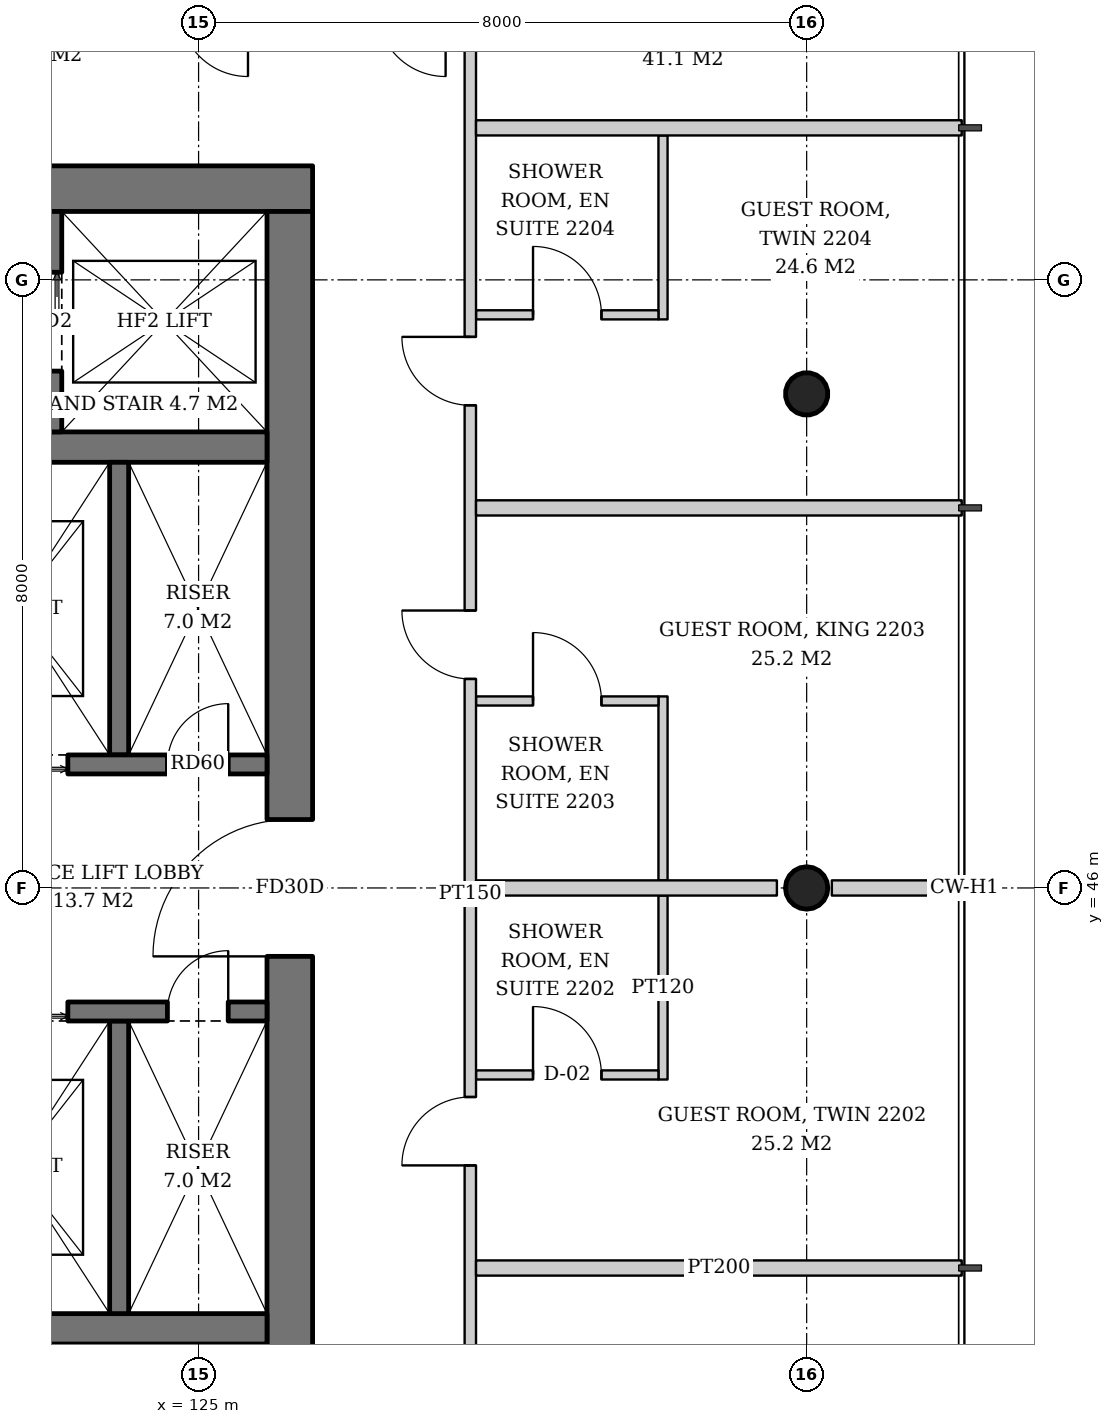
"""IFC4 building model, lengths in metres.
Left out: names, types, materials, properties, quantities, classifications, styles, units other than length and angle.
Written with IfcOpenShell. Run it as: python <this file> out.ifc"""

import sys

from ifc_helpers import new_model, si_unit, direction, frame, frame_2d, origin, origin_2d, place, context, subcontext, project, spatial, rectangle, hollow_circle, extrude, element, fill, save


model = new_model("IFC4")
c1 = context("Model", 3, precision=1e-05, world=origin(), true_north=direction((0.0, 1.0)))
c2 = subcontext(c1, "Body", "Model", "MODEL_VIEW")
j1 = project(units=[si_unit("LENGTHUNIT", "METRE"), si_unit("PLANEANGLEUNIT", "RADIAN")], contexts=[c1])
p1 = place(None, origin())
s1 = spatial("IfcSite", under=j1, at=p1, CompositionType="ELEMENT")
p2 = place(p1, origin())
s2 = spatial("IfcBuilding", under=s1, at=p2, CompositionType="ELEMENT")
p3 = place(p2, frame((0.0, 0.0, 89.4)))
s3 = spatial("IfcBuildingStorey", under=s2, at=p3, CompositionType="ELEMENT", Elevation=89.4)
p4 = place(p3, frame((133.052, 46.0, 0.0), z_axis=(-0.043069538298, 0.0, 0.999072076915), x_axis=(0.0, -1.0, 0.0)))
e1 = element("IfcColumn", 1, at=p4, inside=s3, PredefinedType="COLUMN", context=c2, shape_type="SweptSolid", body=[
    extrude(hollow_circle(Radius=0.28, WallThickness=0.02, at=origin_2d()), origin(), (0.0, 0.0, 1.0), 3.803),
])
p5 = place(p3, frame((133.052, 52.526, 0.0), z_axis=(-0.043059525333, -0.021561848751, 0.998839808957), x_axis=(0.44774654769, -0.894160516368, 0.0)))
e2 = element("IfcColumn", 2, at=p5, inside=s3, PredefinedType="COLUMN", context=c2, shape_type="SweptSolid", body=[
    extrude(hollow_circle(Radius=0.28, WallThickness=0.02, at=origin_2d()), origin(), (0.0, 0.0, 1.0), 3.804),
])
p6 = place(p3, frame((107.5, 55.2, 0.0), z_axis=(0.0, 0.0, 1.0), x_axis=(1.0, 0.0, 0.0)))
e3 = element("IfcWall", 3, at=p6, inside=s3, PredefinedType="SHEAR", context=c2, shape_type="SweptSolid", body=[
    extrude(rectangle(XDim=19.0, YDim=0.6, at=frame_2d((9.5, 0.0))), origin(), (0.0, 0.0, 1.0), 3.8),
])
p7 = place(p6, frame((14.14, 0.0, 0.0)))
e4 = element("IfcOpeningElement", 4, at=p7, cuts=e3, PredefinedType="OPENING", context=c2, shape_type="SweptSolid", body=[
    extrude(rectangle(XDim=1.0, YDim=2.1, at=frame_2d((0.5, 1.05))), frame((0.0, 0.31, 0.0), z_axis=(0.0, -1.0, 0.0), x_axis=(1.0, 0.0, 0.0)), (0.0, 0.0, 1.0), 0.62),
])
p8 = place(p6, frame((2.425, 0.0, 0.0)))
e5 = element("IfcOpeningElement", 5, at=p8, cuts=e3, PredefinedType="OPENING", context=c2, shape_type="SweptSolid", body=[
    extrude(rectangle(XDim=1.0, YDim=2.1, at=frame_2d((0.5, 1.05))), frame((0.0, 0.31, 0.0), z_axis=(0.0, -1.0, 0.0), x_axis=(1.0, 0.0, 0.0)), (0.0, 0.0, 1.0), 0.62),
])
p9 = place(p3, frame((126.2, 37.1, 0.0), z_axis=(0.0, 0.0, 1.0), x_axis=(0.0, 1.0, 0.0)))
e6 = element("IfcWall", 6, at=p9, inside=s3, PredefinedType="SHEAR", context=c2, shape_type="SweptSolid", body=[
    extrude(rectangle(XDim=17.8, YDim=0.6, at=frame_2d((8.9, 0.0))), origin(), (0.0, 0.0, 1.0), 3.8),
])
p10 = place(p9, frame((8.0, 0.0, 0.0)))
e7 = element("IfcOpeningElement", 7, at=p10, cuts=e6, PredefinedType="OPENING", context=c2, shape_type="SweptSolid", body=[
    extrude(rectangle(XDim=1.8, YDim=2.4, at=frame_2d((0.9, 1.2))), frame((0.0, 0.31, 0.0), z_axis=(0.0, -1.0, 0.0), x_axis=(1.0, 0.0, 0.0)), (0.0, 0.0, 1.0), 0.62),
])
for number, where, z_axis, x_axis in (
    (8, (108.1, 40.2, 0.0), (0.0, 0.0, 1.0), (1.0, 0.0, 0.0)),
    (9, (108.1, 51.8, 0.0), (0.0, 0.0, 1.0), (1.0, 0.0, 0.0)),
):
    element("IfcWall", number, at=place(p3, frame(where, z_axis=z_axis, x_axis=x_axis)), inside=s3, PredefinedType="SHEAR", context=c2, shape_type="SweptSolid", body=[
        extrude(rectangle(XDim=17.8, YDim=0.4, at=frame_2d((8.9, 0.0))), origin(), (0.0, 0.0, 1.0), 3.8),
    ])
p11 = place(p3, frame((123.075, 52.0, 0.0), z_axis=(0.0, 0.0, 1.0), x_axis=(0.0, 1.0, 0.0)))
e10 = element("IfcWall", 10, at=p11, inside=s3, PredefinedType="SHEAR", context=c2, shape_type="SweptSolid", body=[
    extrude(rectangle(XDim=2.9, YDim=0.25, at=frame_2d((1.45, 0.0))), origin(), (0.0, 0.0, 1.0), 3.8),
])
p12 = place(p11, frame((0.8, 0.0, 0.0)))
e11 = element("IfcOpeningElement", 11, at=p12, cuts=e10, PredefinedType="OPENING", context=c2, shape_type="SweptSolid", body=[
    extrude(rectangle(XDim=1.3, YDim=2.2, at=frame_2d((0.65, 1.1))), frame((0.0, 0.135, 0.0), z_axis=(0.0, -1.0, 0.0), x_axis=(1.0, 0.0, 0.0)), (0.0, 0.0, 1.0), 0.27),
])
p13 = place(p3, frame((123.955, 47.75, 0.0), z_axis=(0.0, 0.0, 1.0), x_axis=(0.0, 1.0, 0.0)))
e12 = element("IfcWall", 12, at=p13, inside=s3, PredefinedType="SHEAR", context=c2, shape_type="SweptSolid", body=[
    extrude(rectangle(XDim=3.85, YDim=0.25, at=frame_2d((1.925, 0.0))), origin(), (0.0, 0.0, 1.0), 3.8),
])
p14 = place(p3, frame((121.33, 47.625, 0.0), z_axis=(0.0, 0.0, 1.0), x_axis=(1.0, 0.0, 0.0)))
e13 = element("IfcWall", 13, at=p14, inside=s3, PredefinedType="SHEAR", context=c2, shape_type="SweptSolid", body=[
    extrude(rectangle(XDim=4.57, YDim=0.25, at=frame_2d((2.285, 0.0))), origin(), (0.0, 0.0, 1.0), 3.8),
])
p15 = place(p14, frame((0.55, 0.0, 0.0)))
e14 = element("IfcOpeningElement", 14, at=p15, cuts=e13, PredefinedType="OPENING", context=c2, shape_type="SweptSolid", body=[
    extrude(rectangle(XDim=1.4, YDim=2.4, at=frame_2d((0.7, 1.2))), frame((0.0, 0.135, 0.0), z_axis=(0.0, -1.0, 0.0), x_axis=(1.0, 0.0, 0.0)), (0.0, 0.0, 1.0), 0.27),
])
p16 = place(p14, frame((3.26, 0.0, 0.0)))
e15 = element("IfcOpeningElement", 15, at=p16, cuts=e13, PredefinedType="OPENING", context=c2, shape_type="SweptSolid", body=[
    extrude(rectangle(XDim=0.8, YDim=2.0, at=frame_2d((0.4, 1.0))), frame((0.0, 0.135, 0.0), z_axis=(0.0, -1.0, 0.0), x_axis=(1.0, 0.0, 0.0)), (0.0, 0.0, 1.0), 0.27),
])
p17 = place(p3, frame((123.955, 44.25, 0.0), z_axis=(0.0, 0.0, 1.0), x_axis=(0.0, -1.0, 0.0)))
e16 = element("IfcWall", 16, at=p17, inside=s3, PredefinedType="SHEAR", context=c2, shape_type="SweptSolid", body=[
    extrude(rectangle(XDim=3.85, YDim=0.25, at=frame_2d((1.925, 0.0))), origin(), (0.0, 0.0, 1.0), 3.8),
])
p18 = place(p3, frame((121.33, 44.375, 0.0), z_axis=(0.0, 0.0, 1.0), x_axis=(1.0, 0.0, 0.0)))
e17 = element("IfcWall", 17, at=p18, inside=s3, PredefinedType="SHEAR", context=c2, shape_type="SweptSolid", body=[
    extrude(rectangle(XDim=4.57, YDim=0.25, at=frame_2d((2.285, 0.0))), origin(), (0.0, 0.0, 1.0), 3.8),
])
p19 = place(p18, frame((0.55, 0.0, 0.0)))
e18 = element("IfcOpeningElement", 18, at=p19, cuts=e17, PredefinedType="OPENING", context=c2, shape_type="SweptSolid", body=[
    extrude(rectangle(XDim=1.4, YDim=2.4, at=frame_2d((0.7, 1.2))), frame((0.0, 0.135, 0.0), z_axis=(0.0, -1.0, 0.0), x_axis=(1.0, 0.0, 0.0)), (0.0, 0.0, 1.0), 0.27),
])
p20 = place(p18, frame((3.26, 0.0, 0.0)))
e19 = element("IfcOpeningElement", 19, at=p20, cuts=e17, PredefinedType="OPENING", context=c2, shape_type="SweptSolid", body=[
    extrude(rectangle(XDim=0.8, YDim=2.0, at=frame_2d((0.4, 1.0))), frame((0.0, 0.135, 0.0), z_axis=(0.0, -1.0, 0.0), x_axis=(1.0, 0.0, 0.0)), (0.0, 0.0, 1.0), 0.27),
])
p21 = place(p3, frame((131.11, 43.48, 0.0), z_axis=(0.0, 0.0, 1.0), x_axis=(0.0, 1.0, 0.0)))
e20 = element("IfcWall", 20, at=p21, inside=s3, PredefinedType="PARTITIONING", context=c2, shape_type="SweptSolid", body=[
    extrude(rectangle(XDim=2.42, YDim=0.12, at=frame_2d((1.21, 0.0))), origin(), (0.0, 0.0, 1.0), 3.0),
])
p22 = place(p3, frame((128.65, 43.54, 0.0), z_axis=(0.0, 0.0, 1.0), x_axis=(1.0, 0.0, 0.0)))
e21 = element("IfcWall", 21, at=p22, inside=s3, PredefinedType="PARTITIONING", context=c2, shape_type="SweptSolid", body=[
    extrude(rectangle(XDim=2.4, YDim=0.12, at=frame_2d((1.2, 0.0))), origin(), (0.0, 0.0, 1.0), 3.6),
])
p23 = place(p22, frame((0.75, 0.0, 0.0)))
e22 = element("IfcOpeningElement", 22, at=p23, cuts=e21, PredefinedType="OPENING", context=c2, shape_type="SweptSolid", body=[
    extrude(rectangle(XDim=0.9, YDim=2.1, at=frame_2d((0.45, 1.05))), frame((0.0, 0.07, 0.0), z_axis=(0.0, -1.0, 0.0), x_axis=(1.0, 0.0, 0.0)), (0.0, 0.0, 1.0), 0.14),
])
p24 = place(p3, frame((131.11, 46.1, 0.0), z_axis=(0.0, 0.0, 1.0), x_axis=(0.0, 1.0, 0.0)))
e23 = element("IfcWall", 23, at=p24, inside=s3, PredefinedType="PARTITIONING", context=c2, shape_type="SweptSolid", body=[
    extrude(rectangle(XDim=2.42, YDim=0.12, at=frame_2d((1.21, 0.0))), origin(), (0.0, 0.0, 1.0), 3.6),
])
p25 = place(p3, frame((128.65, 48.46, 0.0), z_axis=(0.0, 0.0, 1.0), x_axis=(1.0, 0.0, 0.0)))
e24 = element("IfcWall", 24, at=p25, inside=s3, PredefinedType="PARTITIONING", context=c2, shape_type="SweptSolid", body=[
    extrude(rectangle(XDim=2.4, YDim=0.12, at=frame_2d((1.2, 0.0))), origin(), (0.0, 0.0, 1.0), 3.6),
])
p26 = place(p25, frame((0.75, 0.0, 0.0)))
e25 = element("IfcOpeningElement", 25, at=p26, cuts=e24, PredefinedType="OPENING", context=c2, shape_type="SweptSolid", body=[
    extrude(rectangle(XDim=0.9, YDim=2.1, at=frame_2d((0.45, 1.05))), frame((0.0, 0.07, 0.0), z_axis=(0.0, -1.0, 0.0), x_axis=(1.0, 0.0, 0.0)), (0.0, 0.0, 1.0), 0.14),
])
p27 = place(p3, frame((131.11, 53.48, 0.0), z_axis=(0.0, 0.0, 1.0), x_axis=(0.0, 1.0, 0.0)))
e26 = element("IfcWall", 26, at=p27, inside=s3, PredefinedType="PARTITIONING", context=c2, shape_type="SweptSolid", body=[
    extrude(rectangle(XDim=2.42, YDim=0.12, at=frame_2d((1.21, 0.0))), origin(), (0.0, 0.0, 1.0), 3.0),
])
p28 = place(p3, frame((128.65, 53.54, 0.0), z_axis=(0.0, 0.0, 1.0), x_axis=(1.0, 0.0, 0.0)))
e27 = element("IfcWall", 27, at=p28, inside=s3, PredefinedType="PARTITIONING", context=c2, shape_type="SweptSolid", body=[
    extrude(rectangle(XDim=2.4, YDim=0.12, at=frame_2d((1.2, 0.0))), origin(), (0.0, 0.0, 1.0), 3.0),
])
p29 = place(p28, frame((0.75, 0.0, 0.0)))
e28 = element("IfcOpeningElement", 28, at=p29, cuts=e27, PredefinedType="OPENING", context=c2, shape_type="SweptSolid", body=[
    extrude(rectangle(XDim=0.9, YDim=2.1, at=frame_2d((0.45, 1.05))), frame((0.0, 0.07, 0.0), z_axis=(0.0, -1.0, 0.0), x_axis=(1.0, 0.0, 0.0)), (0.0, 0.0, 1.0), 0.14),
])
p30 = place(p3, frame((128.575, 34.35, 0.0), z_axis=(0.0, 0.0, 1.0), x_axis=(0.0, 1.0, 0.0)))
e29 = element("IfcWall", 29, at=p30, inside=s3, PredefinedType="PARTITIONING", context=c2, shape_type="SweptSolid", body=[
    extrude(rectangle(XDim=23.15, YDim=0.15, at=frame_2d((11.575, 0.0))), origin(), (0.0, 0.0, 1.0), 2.9),
])
p31 = place(p30, frame((0.4, 0.0, 0.0)))
e30 = element("IfcOpeningElement", 30, at=p31, cuts=e29, PredefinedType="OPENING", context=c2, shape_type="SweptSolid", body=[
    extrude(rectangle(XDim=0.9, YDim=2.1, at=frame_2d((0.45, 1.05))), frame((0.0, 0.085, 0.0), z_axis=(0.0, -1.0, 0.0), x_axis=(1.0, 0.0, 0.0)), (0.0, 0.0, 1.0), 0.17),
])
p32 = place(p30, frame((8.0, 0.0, 0.0)))
e31 = element("IfcOpeningElement", 31, at=p32, cuts=e29, PredefinedType="OPENING", context=c2, shape_type="SweptSolid", body=[
    extrude(rectangle(XDim=0.9, YDim=2.1, at=frame_2d((0.45, 1.05))), frame((0.0, 0.085, 0.0), z_axis=(0.0, -1.0, 0.0), x_axis=(1.0, 0.0, 0.0)), (0.0, 0.0, 1.0), 0.17),
])
p33 = place(p30, frame((14.4, 0.0, 0.0)))
e32 = element("IfcOpeningElement", 32, at=p33, cuts=e29, PredefinedType="OPENING", context=c2, shape_type="SweptSolid", body=[
    extrude(rectangle(XDim=0.9, YDim=2.1, at=frame_2d((0.45, 1.05))), frame((0.0, 0.085, 0.0), z_axis=(0.0, -1.0, 0.0), x_axis=(1.0, 0.0, 0.0)), (0.0, 0.0, 1.0), 0.17),
])
p34 = place(p30, frame((18.0, 0.0, 0.0)))
e33 = element("IfcOpeningElement", 33, at=p34, cuts=e29, PredefinedType="OPENING", context=c2, shape_type="SweptSolid", body=[
    extrude(rectangle(XDim=0.9, YDim=2.1, at=frame_2d((0.45, 1.05))), frame((0.0, 0.085, 0.0), z_axis=(0.0, -1.0, 0.0), x_axis=(1.0, 0.0, 0.0)), (0.0, 0.0, 1.0), 0.17),
])
p35 = place(p3, frame((128.65, 41.0, 0.0), z_axis=(0.0, 0.0, 1.0), x_axis=(1.0, 0.0, 0.0)))
e34 = element("IfcWall", 34, at=p35, inside=s3, PredefinedType="PARTITIONING", context=c2, shape_type="SweptSolid", body=[
    extrude(rectangle(XDim=6.39, YDim=0.2, at=frame_2d((3.195, 0.0))), origin(), (0.0, 0.0, 1.0), 3.0),
])
p36 = place(p3, frame((128.65, 46.0, 0.0), z_axis=(0.0, 0.0, 1.0), x_axis=(1.0, 0.0, 0.0)))
e35 = element("IfcWall", 35, at=p36, inside=s3, PredefinedType="PARTITIONING", context=c2, shape_type="SweptSolid", body=[
    extrude(rectangle(XDim=3.958, YDim=0.2, at=frame_2d((1.979, 0.0))), origin(), (0.0, 0.0, 1.0), 3.6),
])
p37 = place(p3, frame((133.331, 46.0, 0.0), z_axis=(0.0, 0.0, 1.0), x_axis=(1.0, 0.0, 0.0)))
e36 = element("IfcWall", 36, at=p37, inside=s3, PredefinedType="PARTITIONING", context=c2, shape_type="SweptSolid", body=[
    extrude(rectangle(XDim=1.709, YDim=0.2, at=frame_2d((0.854, 0.0))), origin(), (0.0, 0.0, 1.0), 3.6),
])
for number, where, z_axis, x_axis in (
    (37, (128.65, 51.0, 0.0), (0.0, 0.0, 1.0), (1.0, 0.0, 0.0)),
    (38, (128.65, 56.0, 0.0), (0.0, 0.0, 1.0), (1.0, 0.0, 0.0)),
):
    element("IfcWall", number, at=place(p3, frame(where, z_axis=z_axis, x_axis=x_axis)), inside=s3, PredefinedType="PARTITIONING", context=c2, shape_type="SweptSolid", body=[
        extrude(rectangle(XDim=6.39, YDim=0.2, at=frame_2d((3.195, 0.0))), origin(), (0.0, 0.0, 1.0), 3.2),
    ])
p38 = place(p12, origin())
e39 = element("IfcDoor", 39, at=p38, inside=s3, OperationType="DOUBLE_DOOR_SLIDING", PredefinedType="DOOR", context=c2, shape_type="SweptSolid", body=[
    extrude(rectangle(XDim=1.3, YDim=2.2, at=frame_2d((0.65, 1.1))), frame((0.0, 0.025, 0.0), z_axis=(0.0, -1.0, 0.0), x_axis=(1.0, 0.0, 0.0)), (0.0, 0.0, 1.0), 0.05),
])
fill(e11, e39)
p39 = place(p15, origin())
e40 = element("IfcDoor", 40, at=p39, inside=s3, OperationType="DOUBLE_DOOR_SLIDING", PredefinedType="DOOR", context=c2, shape_type="SweptSolid", body=[
    extrude(rectangle(XDim=1.4, YDim=2.4, at=frame_2d((0.7, 1.2))), frame((0.0, 0.025, 0.0), z_axis=(0.0, -1.0, 0.0), x_axis=(1.0, 0.0, 0.0)), (0.0, 0.0, 1.0), 0.05),
])
fill(e14, e40)
p40 = place(p16, origin())
e41 = element("IfcDoor", 41, at=p40, inside=s3, OperationType="SINGLE_SWING_RIGHT", PredefinedType="DOOR", context=c2, shape_type="SweptSolid", body=[
    extrude(rectangle(XDim=0.8, YDim=2.0, at=frame_2d((0.4, 1.0))), frame((0.0, 0.025, 0.0), z_axis=(0.0, -1.0, 0.0), x_axis=(1.0, 0.0, 0.0)), (0.0, 0.0, 1.0), 0.05),
])
fill(e15, e41)
p41 = place(p19, origin())
e42 = element("IfcDoor", 42, at=p41, inside=s3, OperationType="DOUBLE_DOOR_SLIDING", PredefinedType="DOOR", context=c2, shape_type="SweptSolid", body=[
    extrude(rectangle(XDim=1.4, YDim=2.4, at=frame_2d((0.7, 1.2))), frame((0.0, 0.025, 0.0), z_axis=(0.0, -1.0, 0.0), x_axis=(1.0, 0.0, 0.0)), (0.0, 0.0, 1.0), 0.05),
])
fill(e18, e42)
p42 = place(p20, origin())
e43 = element("IfcDoor", 43, at=p42, inside=s3, OperationType="SINGLE_SWING_RIGHT", PredefinedType="DOOR", context=c2, shape_type="SweptSolid", body=[
    extrude(rectangle(XDim=0.8, YDim=2.0, at=frame_2d((0.4, 1.0))), frame((0.0, 0.025, 0.0), z_axis=(0.0, -1.0, 0.0), x_axis=(1.0, 0.0, 0.0)), (0.0, 0.0, 1.0), 0.05),
])
fill(e19, e43)
p43 = place(p10, origin())
e44 = element("IfcDoor", 44, at=p43, inside=s3, OperationType="DOUBLE_DOOR_SINGLE_SWING", PredefinedType="DOOR", context=c2, shape_type="SweptSolid", body=[
    extrude(rectangle(XDim=1.8, YDim=2.4, at=frame_2d((0.9, 1.2))), frame((0.0, 0.025, 0.0), z_axis=(0.0, -1.0, 0.0), x_axis=(1.0, 0.0, 0.0)), (0.0, 0.0, 1.0), 0.05),
])
fill(e7, e44)
p44 = place(p23, origin())
e45 = element("IfcDoor", 45, at=p44, inside=s3, OperationType="SINGLE_SWING_LEFT", PredefinedType="DOOR", context=c2, shape_type="SweptSolid", body=[
    extrude(rectangle(XDim=0.9, YDim=2.1, at=frame_2d((0.45, 1.05))), frame((0.0, 0.025, 0.0), z_axis=(0.0, -1.0, 0.0), x_axis=(1.0, 0.0, 0.0)), (0.0, 0.0, 1.0), 0.05),
])
fill(e22, e45)
p45 = place(p26, origin())
e46 = element("IfcDoor", 46, at=p45, inside=s3, OperationType="SINGLE_SWING_LEFT", PredefinedType="DOOR", context=c2, shape_type="SweptSolid", body=[
    extrude(rectangle(XDim=0.9, YDim=2.1, at=frame_2d((0.45, 1.05))), frame((0.0, 0.025, 0.0), z_axis=(0.0, -1.0, 0.0), x_axis=(1.0, 0.0, 0.0)), (0.0, 0.0, 1.0), 0.05),
])
fill(e25, e46)
p46 = place(p29, origin())
e47 = element("IfcDoor", 47, at=p46, inside=s3, OperationType="SINGLE_SWING_LEFT", PredefinedType="DOOR", context=c2, shape_type="SweptSolid", body=[
    extrude(rectangle(XDim=0.9, YDim=2.1, at=frame_2d((0.45, 1.05))), frame((0.0, 0.025, 0.0), z_axis=(0.0, -1.0, 0.0), x_axis=(1.0, 0.0, 0.0)), (0.0, 0.0, 1.0), 0.05),
])
fill(e28, e47)
p47 = place(p32, origin())
e48 = element("IfcDoor", 48, at=p47, inside=s3, OperationType="SINGLE_SWING_LEFT", PredefinedType="DOOR", context=c2, shape_type="SweptSolid", body=[
    extrude(rectangle(XDim=0.9, YDim=2.1, at=frame_2d((0.45, 1.05))), frame((0.0, 0.025, 0.0), z_axis=(0.0, -1.0, 0.0), x_axis=(1.0, 0.0, 0.0)), (0.0, 0.0, 1.0), 0.05),
])
fill(e31, e48)
p48 = place(p33, origin())
e49 = element("IfcDoor", 49, at=p48, inside=s3, OperationType="SINGLE_SWING_RIGHT", PredefinedType="DOOR", context=c2, shape_type="SweptSolid", body=[
    extrude(rectangle(XDim=0.9, YDim=2.1, at=frame_2d((0.45, 1.05))), frame((0.0, 0.025, 0.0), z_axis=(0.0, -1.0, 0.0), x_axis=(1.0, 0.0, 0.0)), (0.0, 0.0, 1.0), 0.05),
])
fill(e32, e49)
p49 = place(p34, origin())
e50 = element("IfcDoor", 50, at=p49, inside=s3, OperationType="SINGLE_SWING_RIGHT", PredefinedType="DOOR", context=c2, shape_type="SweptSolid", body=[
    extrude(rectangle(XDim=0.9, YDim=2.1, at=frame_2d((0.45, 1.05))), frame((0.0, 0.025, 0.0), z_axis=(0.0, -1.0, 0.0), x_axis=(1.0, 0.0, 0.0)), (0.0, 0.0, 1.0), 0.05),
])
fill(e33, e50)
save(model, sys.argv[1])
